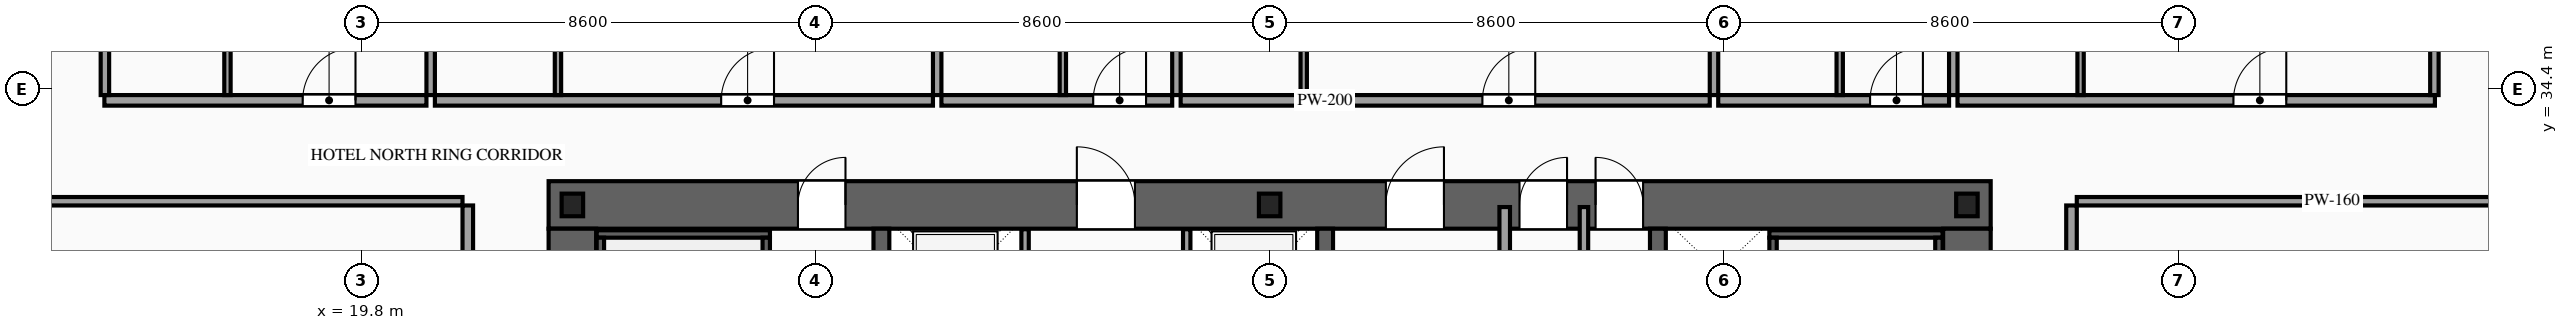
"""IFC4 building model, lengths in metres.
Left out: names, types, materials, properties, quantities, classifications, styles, units other than length and angle.
Written with IfcOpenShell. Run it as: python <this file> out.ifc"""

import sys

from ifc_helpers import new_model, si_unit, direction, frame, frame_2d, origin, origin_2d, place, context, subcontext, project, spatial, rectangle, i_section, extrude, source, transform, mapped, element, fill, save


model = new_model("IFC4")
c1 = context("Model", 3, precision=1e-05, world=origin(), true_north=direction((0.0, 1.0)))
c2 = subcontext(c1, "Body", "Model", "MODEL_VIEW")
j1 = project(units=[si_unit("LENGTHUNIT", "METRE"), si_unit("PLANEANGLEUNIT", "RADIAN")], contexts=[c1])
p1 = place(None, origin())
s1 = spatial("IfcSite", under=j1, at=p1, CompositionType="ELEMENT")
p2 = place(p1, origin())
s2 = spatial("IfcBuilding", under=s1, at=p2, CompositionType="ELEMENT")
p3 = place(p2, frame((0.0, 0.0, 67.6)))
s3 = spatial("IfcBuildingStorey", under=s2, at=p3, CompositionType="ELEMENT", Elevation=67.6)
p4 = place(p3, frame((23.35, 32.2, 0.0), z_axis=(0.0, 0.0, 1.0), x_axis=(1.0, 0.0, 0.0)))
e1 = element("IfcWall", 1, at=p4, inside=s3, PredefinedType="SHEAR", context=c2, shape_type="SweptSolid", body=[
    extrude(rectangle(XDim=27.3, YDim=0.9, at=frame_2d((13.65, 0.0))), origin(), (0.0, 0.0, 1.0), 3.6),
])
p5 = place(p4, frame((4.72, 0.0, 0.0)))
e2 = element("IfcOpeningElement", 2, at=p5, cuts=e1, PredefinedType="OPENING", context=c2, shape_type="SweptSolid", body=[
    extrude(rectangle(XDim=0.9, YDim=2.15, at=frame_2d((0.45, 1.075))), frame((0.0, 0.465, 0.0), z_axis=(0.0, -1.0, 0.0), x_axis=(1.0, 0.0, 0.0)), (0.0, 0.0, 1.0), 0.93),
])
p6 = place(p4, frame((10.0, 0.0, 0.0)))
e3 = element("IfcOpeningElement", 3, at=p6, cuts=e1, PredefinedType="OPENING", context=c2, shape_type="SweptSolid", body=[
    extrude(rectangle(XDim=1.1, YDim=2.2, at=frame_2d((0.55, 1.1))), frame((0.0, 0.465, 0.0), z_axis=(0.0, -1.0, 0.0), x_axis=(1.0, 0.0, 0.0)), (0.0, 0.0, 1.0), 0.93),
])
p7 = place(p4, frame((15.85, 0.0, 0.0)))
e4 = element("IfcOpeningElement", 4, at=p7, cuts=e1, PredefinedType="OPENING", context=c2, shape_type="SweptSolid", body=[
    extrude(rectangle(XDim=1.1, YDim=2.2, at=frame_2d((0.55, 1.1))), frame((0.0, 0.465, 0.0), z_axis=(0.0, -1.0, 0.0), x_axis=(1.0, 0.0, 0.0)), (0.0, 0.0, 1.0), 0.93),
])
p8 = place(p4, frame((18.38, 0.0, 0.0)))
e5 = element("IfcOpeningElement", 5, at=p8, cuts=e1, PredefinedType="OPENING", context=c2, shape_type="SweptSolid", body=[
    extrude(rectangle(XDim=0.9, YDim=2.15, at=frame_2d((0.45, 1.075))), frame((0.0, 0.465, 0.0), z_axis=(0.0, -1.0, 0.0), x_axis=(1.0, 0.0, 0.0)), (0.0, 0.0, 1.0), 0.93),
])
p9 = place(p4, frame((19.82, 0.0, 0.0)))
e6 = element("IfcOpeningElement", 6, at=p9, cuts=e1, PredefinedType="OPENING", context=c2, shape_type="SweptSolid", body=[
    extrude(rectangle(XDim=0.9, YDim=2.15, at=frame_2d((0.45, 1.075))), frame((0.0, 0.465, 0.0), z_axis=(0.0, -1.0, 0.0), x_axis=(1.0, 0.0, 0.0)), (0.0, 0.0, 1.0), 0.93),
])
m1 = source(origin(), c2, "Body", "SweptSolid", [
    extrude(rectangle(XDim=11.9, YDim=0.9, at=frame_2d((5.95, 0.0))), origin(), (0.0, 0.0, 1.0), 3.6),
])
for number, where, z_axis, x_axis in (
    (7, (23.8, 19.85, 0.0), (0.0, 0.0, 1.0), (0.0, 1.0, 0.0)),
    (8, (50.2, 19.85, 0.0), (0.0, 0.0, 1.0), (0.0, 1.0, 0.0)),
):
    element("IfcWall", number, at=place(p3, frame(where, z_axis=z_axis, x_axis=x_axis)), inside=s3, PredefinedType="SHEAR", context=c2, shape_type="MappedRepresentation", body=[
        mapped(m1, transform((0.0, 0.0, 0.0), scale=1.0)),
    ])
m2 = source(origin(), c2, "Body", "SweptSolid", [
    extrude(rectangle(XDim=11.9, YDim=0.3, at=frame_2d((5.95, 0.0))), origin(), (0.0, 0.0, 1.0), 3.6),
])
for number, where, z_axis, x_axis in (
    (9, (29.65, 19.85, 0.0), (0.0, 0.0, 1.0), (0.0, 1.0, 0.0)),
    (10, (38.05, 19.85, 0.0), (0.0, 0.0, 1.0), (0.0, 1.0, 0.0)),
    (11, (44.35, 19.85, 0.0), (0.0, 0.0, 1.0), (0.0, 1.0, 0.0)),
):
    element("IfcWall", number, at=place(p3, frame(where, z_axis=z_axis, x_axis=x_axis)), inside=s3, PredefinedType="SOLIDWALL", context=c2, shape_type="MappedRepresentation", body=[
        mapped(m2, transform((0.0, 0.0, 0.0), scale=1.0)),
    ])
m3 = source(origin(), c2, "Body", "SweptSolid", [
    extrude(i_section(OverallWidth=0.407, OverallDepth=0.428, WebThickness=0.02, FlangeThickness=0.035, at=origin_2d()), origin(), (0.0, 0.0, 1.0), 3.6),
])
for number, where, z_axis, x_axis in (
    (12, (23.8, 32.2, 0.0), (0.0, 0.0, 1.0), (1.0, 0.0, 0.0)),
    (13, (37.0, 32.2, 0.0), (0.0, 0.0, 1.0), (1.0, 0.0, 0.0)),
    (14, (50.2, 32.2, 0.0), (0.0, 0.0, 1.0), (1.0, 0.0, 0.0)),
):
    element("IfcColumn", number, at=place(p3, frame(where, z_axis=z_axis, x_axis=x_axis)), inside=s3, PredefinedType="COLUMN", context=c2, shape_type="MappedRepresentation", body=[
        mapped(m3, transform((0.0, 0.0, 0.0), scale=1.0)),
    ])
p10 = place(p3, frame((32.37, 29.4, 0.0), z_axis=(0.0, 0.0, 1.0), x_axis=(0.0, 1.0, 0.0)))
e15 = element("IfcWall", 15, at=p10, inside=s3, PredefinedType="SOLIDWALL", context=c2, shape_type="SweptSolid", body=[
    extrude(rectangle(XDim=2.34, YDim=0.14, at=frame_2d((1.17, 0.0))), origin(), (0.0, 0.0, 1.0), 3.38),
])
p11 = place(p10, frame((0.62, 0.0, 0.0)))
e16 = element("IfcOpeningElement", 16, at=p11, cuts=e15, PredefinedType="OPENING", context=c2, shape_type="SweptSolid", body=[
    extrude(rectangle(XDim=1.1, YDim=2.2, at=frame_2d((0.55, 1.1))), frame((0.0, 0.085, 0.0), z_axis=(0.0, -1.0, 0.0), x_axis=(1.0, 0.0, 0.0)), (0.0, 0.0, 1.0), 0.17),
])
p12 = place(p3, frame((35.43, 29.4, 0.0), z_axis=(0.0, 0.0, 1.0), x_axis=(0.0, 1.0, 0.0)))
e17 = element("IfcWall", 17, at=p12, inside=s3, PredefinedType="SOLIDWALL", context=c2, shape_type="SweptSolid", body=[
    extrude(rectangle(XDim=2.34, YDim=0.14, at=frame_2d((1.17, 0.0))), origin(), (0.0, 0.0, 1.0), 3.38),
])
p13 = place(p12, frame((0.62, 0.0, 0.0)))
e18 = element("IfcOpeningElement", 18, at=p13, cuts=e17, PredefinedType="OPENING", context=c2, shape_type="SweptSolid", body=[
    extrude(rectangle(XDim=1.1, YDim=2.2, at=frame_2d((0.55, 1.1))), frame((0.0, 0.085, 0.0), z_axis=(0.0, -1.0, 0.0), x_axis=(1.0, 0.0, 0.0)), (0.0, 0.0, 1.0), 0.17),
])
m4 = source(origin(), c2, "Body", "SweptSolid", [
    extrude(rectangle(XDim=3.28, YDim=0.14, at=frame_2d((1.64, 0.0))), origin(), (0.0, 0.0, 1.0), 3.38),
])
p14 = place(p3, frame((24.26, 31.65, 0.0), z_axis=(0.0, 0.0, 1.0), x_axis=(1.0, 0.0, 0.0)))
e19 = element("IfcWall", 19, at=p14, inside=s3, PredefinedType="SOLIDWALL", context=c2, shape_type="MappedRepresentation", body=[
    mapped(m4, transform((0.0, 0.0, 0.0), scale=1.0)),
])
m5 = source(origin(), c2, "Body", "SweptSolid", [
    extrude(rectangle(XDim=8.94, YDim=0.14, at=frame_2d((4.47, 0.0))), origin(), (0.0, 0.0, 1.0), 3.38),
])
for number, where, z_axis, x_axis in (
    (20, (24.33, 22.64, 0.0), (0.0, 0.0, 1.0), (0.0, 1.0, 0.0)),
    (21, (27.47, 22.64, 0.0), (0.0, 0.0, 1.0), (0.0, 1.0, 0.0)),
):
    element("IfcWall", number, at=place(p3, frame(where, z_axis=z_axis, x_axis=x_axis)), inside=s3, PredefinedType="SOLIDWALL", context=c2, shape_type="MappedRepresentation", body=[
        mapped(m5, transform((0.0, 0.0, 0.0), scale=1.0)),
    ])
p15 = place(p3, frame((46.46, 31.65, 0.0), z_axis=(0.0, 0.0, 1.0), x_axis=(1.0, 0.0, 0.0)))
e22 = element("IfcWall", 22, at=p15, inside=s3, PredefinedType="SOLIDWALL", context=c2, shape_type="MappedRepresentation", body=[
    mapped(m4, transform((0.0, 0.0, 0.0), scale=1.0)),
])
for number, where, z_axis, x_axis in (
    (23, (46.53, 22.64, 0.0), (0.0, 0.0, 1.0), (0.0, 1.0, 0.0)),
    (24, (49.67, 22.64, 0.0), (0.0, 0.0, 1.0), (0.0, 1.0, 0.0)),
):
    element("IfcWall", number, at=place(p3, frame(where, z_axis=z_axis, x_axis=x_axis)), inside=s3, PredefinedType="SOLIDWALL", context=c2, shape_type="MappedRepresentation", body=[
        mapped(m5, transform((0.0, 0.0, 0.0), scale=1.0)),
    ])
m6 = source(origin(), c2, "Body", "SweptSolid", [
    extrude(rectangle(XDim=5.96, YDim=0.2, at=frame_2d((2.98, 0.0))), origin(), (0.0, 0.0, 1.0), 3.38),
])
p16 = place(p3, frame((41.45, 26.2, 0.0), z_axis=(0.0, 0.0, 1.0), x_axis=(0.0, 1.0, 0.0)))
e25 = element("IfcWall", 25, at=p16, inside=s3, PredefinedType="PARTITIONING", context=c2, shape_type="MappedRepresentation", body=[
    mapped(m6, transform((0.0, 0.0, 0.0), scale=1.0)),
])
m7 = source(origin(), c2, "Body", "SweptSolid", [
    extrude(rectangle(XDim=5.96, YDim=0.16, at=frame_2d((2.98, 0.0))), origin(), (0.0, 0.0, 1.0), 3.38),
])
p17 = place(p3, frame((42.95, 26.2, 0.0), z_axis=(0.0, 0.0, 1.0), x_axis=(0.0, 1.0, 0.0)))
e26 = element("IfcWall", 26, at=p17, inside=s3, PredefinedType="PARTITIONING", context=c2, shape_type="MappedRepresentation", body=[
    mapped(m7, transform((0.0, 0.0, 0.0), scale=1.0)),
])
p18 = place(p3, frame((14.94, 34.18, 0.0), z_axis=(0.0, 0.0, 1.0), x_axis=(1.0, 0.0, 0.0)))
e27 = element("IfcWall", 27, at=p18, inside=s3, PredefinedType="PARTITIONING", context=c2, shape_type="SweptSolid", body=[
    extrude(rectangle(XDim=6.097, YDim=0.2, at=frame_2d((3.049, 0.0))), origin(), (0.0, 0.0, 1.0), 3.38),
])
p19 = place(p18, frame((3.754, 0.0, 0.0)))
e28 = element("IfcOpeningElement", 28, at=p19, cuts=e27, PredefinedType="OPENING", context=c2, shape_type="SweptSolid", body=[
    extrude(rectangle(XDim=1.0, YDim=2.2, at=frame_2d((0.5, 1.1))), frame((0.0, 0.115, 0.0), z_axis=(0.0, -1.0, 0.0), x_axis=(1.0, 0.0, 0.0)), (0.0, 0.0, 1.0), 0.23),
])
m8 = source(origin(), c2, "Body", "SweptSolid", [
    extrude(rectangle(XDim=16.47, YDim=0.16, at=frame_2d((8.235, 0.0))), origin(), (0.0, 0.0, 1.0), 3.38),
])
p20 = place(p3, frame((21.117, 34.28, 0.0), z_axis=(0.0, 0.0, 1.0), x_axis=(0.0, 1.0, 0.0)))
e29 = element("IfcWall", 29, at=p20, inside=s3, PredefinedType="PARTITIONING", context=c2, shape_type="MappedRepresentation", body=[
    mapped(m8, transform((0.0, 0.0, 0.0), scale=1.0)),
])
m9 = source(origin(), c2, "Body", "SweptSolid", [
    extrude(rectangle(XDim=2.42, YDim=0.12, at=frame_2d((1.21, 0.0))), origin(), (0.0, 0.0, 1.0), 3.38),
])
p21 = place(p3, frame((17.27, 34.28, 0.0), z_axis=(0.0, 0.0, 1.0), x_axis=(0.0, 1.0, 0.0)))
e30 = element("IfcWall", 30, at=p21, inside=s3, PredefinedType="PARTITIONING", context=c2, shape_type="MappedRepresentation", body=[
    mapped(m9, transform((0.0, 0.0, 0.0), scale=1.0)),
])
p22 = place(p3, frame((21.197, 34.18, 0.0), z_axis=(0.0, 0.0, 1.0), x_axis=(1.0, 0.0, 0.0)))
e31 = element("IfcWall", 31, at=p22, inside=s3, PredefinedType="PARTITIONING", context=c2, shape_type="SweptSolid", body=[
    extrude(rectangle(XDim=9.429, YDim=0.2, at=frame_2d((4.714, 0.0))), origin(), (0.0, 0.0, 1.0), 3.38),
])
p23 = place(p22, frame((5.42, 0.0, 0.0)))
e32 = element("IfcOpeningElement", 32, at=p23, cuts=e31, PredefinedType="OPENING", context=c2, shape_type="SweptSolid", body=[
    extrude(rectangle(XDim=1.0, YDim=2.2, at=frame_2d((0.5, 1.1))), frame((0.0, 0.115, 0.0), z_axis=(0.0, -1.0, 0.0), x_axis=(1.0, 0.0, 0.0)), (0.0, 0.0, 1.0), 0.23),
])
p24 = place(p3, frame((30.706, 34.28, 0.0), z_axis=(0.0, 0.0, 1.0), x_axis=(0.0, 1.0, 0.0)))
e33 = element("IfcWall", 33, at=p24, inside=s3, PredefinedType="PARTITIONING", context=c2, shape_type="MappedRepresentation", body=[
    mapped(m8, transform((0.0, 0.0, 0.0), scale=1.0)),
])
p25 = place(p3, frame((23.527, 34.28, 0.0), z_axis=(0.0, 0.0, 1.0), x_axis=(0.0, 1.0, 0.0)))
e34 = element("IfcWall", 34, at=p25, inside=s3, PredefinedType="PARTITIONING", context=c2, shape_type="MappedRepresentation", body=[
    mapped(m9, transform((0.0, 0.0, 0.0), scale=1.0)),
])
p26 = place(p3, frame((30.786, 34.18, 0.0), z_axis=(0.0, 0.0, 1.0), x_axis=(1.0, 0.0, 0.0)))
e35 = element("IfcWall", 35, at=p26, inside=s3, PredefinedType="PARTITIONING", context=c2, shape_type="SweptSolid", body=[
    extrude(rectangle(XDim=4.369, YDim=0.2, at=frame_2d((2.185, 0.0))), origin(), (0.0, 0.0, 1.0), 3.38),
])
p27 = place(p26, frame((2.874, 0.0, 0.0)))
e36 = element("IfcOpeningElement", 36, at=p27, cuts=e35, PredefinedType="OPENING", context=c2, shape_type="SweptSolid", body=[
    extrude(rectangle(XDim=1.0, YDim=2.2, at=frame_2d((0.5, 1.1))), frame((0.0, 0.115, 0.0), z_axis=(0.0, -1.0, 0.0), x_axis=(1.0, 0.0, 0.0)), (0.0, 0.0, 1.0), 0.23),
])
p28 = place(p3, frame((35.235, 34.28, 0.0), z_axis=(0.0, 0.0, 1.0), x_axis=(0.0, 1.0, 0.0)))
e37 = element("IfcWall", 37, at=p28, inside=s3, PredefinedType="PARTITIONING", context=c2, shape_type="MappedRepresentation", body=[
    mapped(m8, transform((0.0, 0.0, 0.0), scale=1.0)),
])
p29 = place(p3, frame((33.085, 34.28, 0.0), z_axis=(0.0, 0.0, 1.0), x_axis=(0.0, 1.0, 0.0)))
e38 = element("IfcWall", 38, at=p29, inside=s3, PredefinedType="PARTITIONING", context=c2, shape_type="MappedRepresentation", body=[
    mapped(m9, transform((0.0, 0.0, 0.0), scale=1.0)),
])
p30 = place(p3, frame((35.315, 34.18, 0.0), z_axis=(0.0, 0.0, 1.0), x_axis=(1.0, 0.0, 0.0)))
e39 = element("IfcWall", 39, at=p30, inside=s3, PredefinedType="PARTITIONING", context=c2, shape_type="SweptSolid", body=[
    extrude(rectangle(XDim=10.017, YDim=0.2, at=frame_2d((5.009, 0.0))), origin(), (0.0, 0.0, 1.0), 3.38),
])
p31 = place(p30, frame((5.713, 0.0, 0.0)))
e40 = element("IfcOpeningElement", 40, at=p31, cuts=e39, PredefinedType="OPENING", context=c2, shape_type="SweptSolid", body=[
    extrude(rectangle(XDim=1.0, YDim=2.2, at=frame_2d((0.5, 1.1))), frame((0.0, 0.115, 0.0), z_axis=(0.0, -1.0, 0.0), x_axis=(1.0, 0.0, 0.0)), (0.0, 0.0, 1.0), 0.23),
])
p32 = place(p3, frame((45.412, 34.28, 0.0), z_axis=(0.0, 0.0, 1.0), x_axis=(0.0, 1.0, 0.0)))
e41 = element("IfcWall", 41, at=p32, inside=s3, PredefinedType="PARTITIONING", context=c2, shape_type="MappedRepresentation", body=[
    mapped(m8, transform((0.0, 0.0, 0.0), scale=1.0)),
])
p33 = place(p3, frame((37.645, 34.28, 0.0), z_axis=(0.0, 0.0, 1.0), x_axis=(0.0, 1.0, 0.0)))
e42 = element("IfcWall", 42, at=p33, inside=s3, PredefinedType="PARTITIONING", context=c2, shape_type="MappedRepresentation", body=[
    mapped(m9, transform((0.0, 0.0, 0.0), scale=1.0)),
])
p34 = place(p3, frame((45.492, 34.18, 0.0), z_axis=(0.0, 0.0, 1.0), x_axis=(1.0, 0.0, 0.0)))
e43 = element("IfcWall", 43, at=p34, inside=s3, PredefinedType="PARTITIONING", context=c2, shape_type="SweptSolid", body=[
    extrude(rectangle(XDim=4.37, YDim=0.2, at=frame_2d((2.185, 0.0))), origin(), (0.0, 0.0, 1.0), 3.38),
])
p35 = place(p34, frame((2.875, 0.0, 0.0)))
e44 = element("IfcOpeningElement", 44, at=p35, cuts=e43, PredefinedType="OPENING", context=c2, shape_type="SweptSolid", body=[
    extrude(rectangle(XDim=1.0, YDim=2.2, at=frame_2d((0.5, 1.1))), frame((0.0, 0.115, 0.0), z_axis=(0.0, -1.0, 0.0), x_axis=(1.0, 0.0, 0.0)), (0.0, 0.0, 1.0), 0.23),
])
p36 = place(p3, frame((49.942, 34.28, 0.0), z_axis=(0.0, 0.0, 1.0), x_axis=(0.0, 1.0, 0.0)))
e45 = element("IfcWall", 45, at=p36, inside=s3, PredefinedType="PARTITIONING", context=c2, shape_type="MappedRepresentation", body=[
    mapped(m8, transform((0.0, 0.0, 0.0), scale=1.0)),
])
p37 = place(p3, frame((47.792, 34.28, 0.0), z_axis=(0.0, 0.0, 1.0), x_axis=(0.0, 1.0, 0.0)))
e46 = element("IfcWall", 46, at=p37, inside=s3, PredefinedType="PARTITIONING", context=c2, shape_type="MappedRepresentation", body=[
    mapped(m9, transform((0.0, 0.0, 0.0), scale=1.0)),
])
p38 = place(p3, frame((50.022, 34.18, 0.0), z_axis=(0.0, 0.0, 1.0), x_axis=(1.0, 0.0, 0.0)))
e47 = element("IfcWall", 47, at=p38, inside=s3, PredefinedType="PARTITIONING", context=c2, shape_type="SweptSolid", body=[
    extrude(rectangle(XDim=9.038, YDim=0.2, at=frame_2d((4.519, 0.0))), origin(), (0.0, 0.0, 1.0), 3.38),
])
p39 = place(p38, frame((5.224, 0.0, 0.0)))
e48 = element("IfcOpeningElement", 48, at=p39, cuts=e47, PredefinedType="OPENING", context=c2, shape_type="SweptSolid", body=[
    extrude(rectangle(XDim=1.0, YDim=2.2, at=frame_2d((0.5, 1.1))), frame((0.0, 0.115, 0.0), z_axis=(0.0, -1.0, 0.0), x_axis=(1.0, 0.0, 0.0)), (0.0, 0.0, 1.0), 0.23),
])
m10 = source(origin(), c2, "Body", "SweptSolid", [
    extrude(rectangle(XDim=16.32, YDim=0.16, at=frame_2d((8.16, 0.0))), origin(), (0.0, 0.0, 1.0), 3.38),
])
for number, where, z_axis, x_axis in (
    (49, (14.95, 34.28, 0.0), (0.0, 0.0, 1.0), (0.0, 1.0, 0.0)),
    (50, (59.05, 34.28, 0.0), (0.0, 0.0, 1.0), (0.0, 1.0, 0.0)),
):
    element("IfcWall", number, at=place(p3, frame(where, z_axis=z_axis, x_axis=x_axis)), inside=s3, PredefinedType="PARTITIONING", context=c2, shape_type="MappedRepresentation", body=[
        mapped(m10, transform((0.0, 0.0, 0.0), scale=1.0)),
    ])
p40 = place(p3, frame((52.352, 34.28, 0.0), z_axis=(0.0, 0.0, 1.0), x_axis=(0.0, 1.0, 0.0)))
e51 = element("IfcWall", 51, at=p40, inside=s3, PredefinedType="PARTITIONING", context=c2, shape_type="MappedRepresentation", body=[
    mapped(m9, transform((0.0, 0.0, 0.0), scale=1.0)),
])
p41 = place(p3, frame((21.82, 25.88, 0.0), z_axis=(0.0, 0.0, 1.0), x_axis=(0.0, 1.0, 0.0)))
e52 = element("IfcWall", 52, at=p41, inside=s3, PredefinedType="PARTITIONING", context=c2, shape_type="SweptSolid", body=[
    extrude(rectangle(XDim=6.31, YDim=0.2, at=frame_2d((3.155, 0.0))), origin(), (0.0, 0.0, 1.0), 3.38),
])
p42 = place(p41, frame((2.655, 0.0, 0.0)))
e53 = element("IfcOpeningElement", 53, at=p42, cuts=e52, PredefinedType="OPENING", context=c2, shape_type="SweptSolid", body=[
    extrude(rectangle(XDim=1.0, YDim=2.2, at=frame_2d((0.5, 1.1))), frame((0.0, 0.115, 0.0), z_axis=(0.0, -1.0, 0.0), x_axis=(1.0, 0.0, 0.0)), (0.0, 0.0, 1.0), 0.23),
])
m11 = source(origin(), c2, "Body", "SweptSolid", [
    extrude(rectangle(XDim=9.67, YDim=0.16, at=frame_2d((4.835, 0.0))), origin(), (0.0, 0.0, 1.0), 2.875),
])
p43 = place(p3, frame((12.05, 32.27, 0.0), z_axis=(0.0, 0.0, 1.0), x_axis=(1.0, 0.0, 0.0)))
e54 = element("IfcWall", 54, at=p43, inside=s3, PredefinedType="PARTITIONING", context=c2, shape_type="MappedRepresentation", body=[
    mapped(m11, transform((0.0, 0.0, 0.0), scale=1.0)),
])
p44 = place(p3, frame((52.18, 25.88, 0.0), z_axis=(0.0, 0.0, 1.0), x_axis=(0.0, 1.0, 0.0)))
e55 = element("IfcWall", 55, at=p44, inside=s3, PredefinedType="PARTITIONING", context=c2, shape_type="SweptSolid", body=[
    extrude(rectangle(XDim=6.31, YDim=0.2, at=frame_2d((3.155, 0.0))), origin(), (0.0, 0.0, 1.0), 3.38),
])
p45 = place(p44, frame((2.655, 0.0, 0.0)))
e56 = element("IfcOpeningElement", 56, at=p45, cuts=e55, PredefinedType="OPENING", context=c2, shape_type="SweptSolid", body=[
    extrude(rectangle(XDim=1.0, YDim=2.2, at=frame_2d((0.5, 1.1))), frame((0.0, 0.115, 0.0), z_axis=(0.0, -1.0, 0.0), x_axis=(1.0, 0.0, 0.0)), (0.0, 0.0, 1.0), 0.23),
])
p46 = place(p3, frame((52.28, 32.27, 0.0), z_axis=(0.0, 0.0, 1.0), x_axis=(1.0, 0.0, 0.0)))
e57 = element("IfcWall", 57, at=p46, inside=s3, PredefinedType="PARTITIONING", context=c2, shape_type="MappedRepresentation", body=[
    mapped(m11, transform((0.0, 0.0, 0.0), scale=1.0)),
])
m12 = source(origin(), c2, "Body", "SweptSolid", [
    extrude(rectangle(XDim=0.9, YDim=2.15, at=frame_2d((0.45, 1.075))), frame((0.0, 0.025, 0.0), z_axis=(0.0, -1.0, 0.0), x_axis=(1.0, 0.0, 0.0)), (0.0, 0.0, 1.0), 0.05),
])
p47 = place(p5, origin())
e58 = element("IfcDoor", 58, at=p47, inside=s3, OperationType="SINGLE_SWING_RIGHT", PredefinedType="DOOR", context=c2, shape_type="MappedRepresentation", body=[
    mapped(m12, transform((0.0, 0.0, 0.0), scale=1.0)),
])
fill(e2, e58)
m13 = source(origin(), c2, "Body", "SweptSolid", [
    extrude(rectangle(XDim=1.1, YDim=2.2, at=frame_2d((0.55, 1.1))), frame((0.0, 0.025, 0.0), z_axis=(0.0, -1.0, 0.0), x_axis=(1.0, 0.0, 0.0)), (0.0, 0.0, 1.0), 0.05),
])
p48 = place(p6, origin())
e59 = element("IfcDoor", 59, at=p48, inside=s3, OperationType="SINGLE_SWING_LEFT", PredefinedType="DOOR", context=c2, shape_type="MappedRepresentation", body=[
    mapped(m13, transform((0.0, 0.0, 0.0), scale=1.0)),
])
fill(e3, e59)
p49 = place(p7, origin())
e60 = element("IfcDoor", 60, at=p49, inside=s3, OperationType="SINGLE_SWING_RIGHT", PredefinedType="DOOR", context=c2, shape_type="MappedRepresentation", body=[
    mapped(m13, transform((0.0, 0.0, 0.0), scale=1.0)),
])
fill(e4, e60)
p50 = place(p8, origin())
e61 = element("IfcDoor", 61, at=p50, inside=s3, OperationType="SINGLE_SWING_RIGHT", PredefinedType="DOOR", context=c2, shape_type="MappedRepresentation", body=[
    mapped(m12, transform((0.0, 0.0, 0.0), scale=1.0)),
])
fill(e5, e61)
p51 = place(p9, origin())
e62 = element("IfcDoor", 62, at=p51, inside=s3, OperationType="SINGLE_SWING_LEFT", PredefinedType="DOOR", context=c2, shape_type="MappedRepresentation", body=[
    mapped(m12, transform((0.0, 0.0, 0.0), scale=1.0)),
])
fill(e6, e62)
m14 = source(origin(), c2, "Body", "SweptSolid", [
    extrude(rectangle(XDim=1.0, YDim=2.2, at=frame_2d((0.5, 1.1))), frame((0.0, 0.025, 0.0), z_axis=(0.0, -1.0, 0.0), x_axis=(1.0, 0.0, 0.0)), (0.0, 0.0, 1.0), 0.05),
])
p52 = place(p19, origin())
e63 = element("IfcDoor", 63, at=p52, inside=s3, OperationType="SINGLE_SWING_RIGHT", PredefinedType="DOOR", context=c2, shape_type="MappedRepresentation", body=[
    mapped(m14, transform((0.0, 0.0, 0.0), scale=1.0)),
])
fill(e28, e63)
p53 = place(p23, origin())
e64 = element("IfcDoor", 64, at=p53, inside=s3, OperationType="SINGLE_SWING_RIGHT", PredefinedType="DOOR", context=c2, shape_type="MappedRepresentation", body=[
    mapped(m14, transform((0.0, 0.0, 0.0), scale=1.0)),
])
fill(e32, e64)
p54 = place(p27, origin())
e65 = element("IfcDoor", 65, at=p54, inside=s3, OperationType="SINGLE_SWING_RIGHT", PredefinedType="DOOR", context=c2, shape_type="MappedRepresentation", body=[
    mapped(m14, transform((0.0, 0.0, 0.0), scale=1.0)),
])
fill(e36, e65)
p55 = place(p31, origin())
e66 = element("IfcDoor", 66, at=p55, inside=s3, OperationType="SINGLE_SWING_RIGHT", PredefinedType="DOOR", context=c2, shape_type="MappedRepresentation", body=[
    mapped(m14, transform((0.0, 0.0, 0.0), scale=1.0)),
])
fill(e40, e66)
p56 = place(p35, origin())
e67 = element("IfcDoor", 67, at=p56, inside=s3, OperationType="SINGLE_SWING_RIGHT", PredefinedType="DOOR", context=c2, shape_type="MappedRepresentation", body=[
    mapped(m14, transform((0.0, 0.0, 0.0), scale=1.0)),
])
fill(e44, e67)
p57 = place(p39, origin())
e68 = element("IfcDoor", 68, at=p57, inside=s3, OperationType="SINGLE_SWING_RIGHT", PredefinedType="DOOR", context=c2, shape_type="MappedRepresentation", body=[
    mapped(m14, transform((0.0, 0.0, 0.0), scale=1.0)),
])
fill(e48, e68)
save(model, sys.argv[1])
